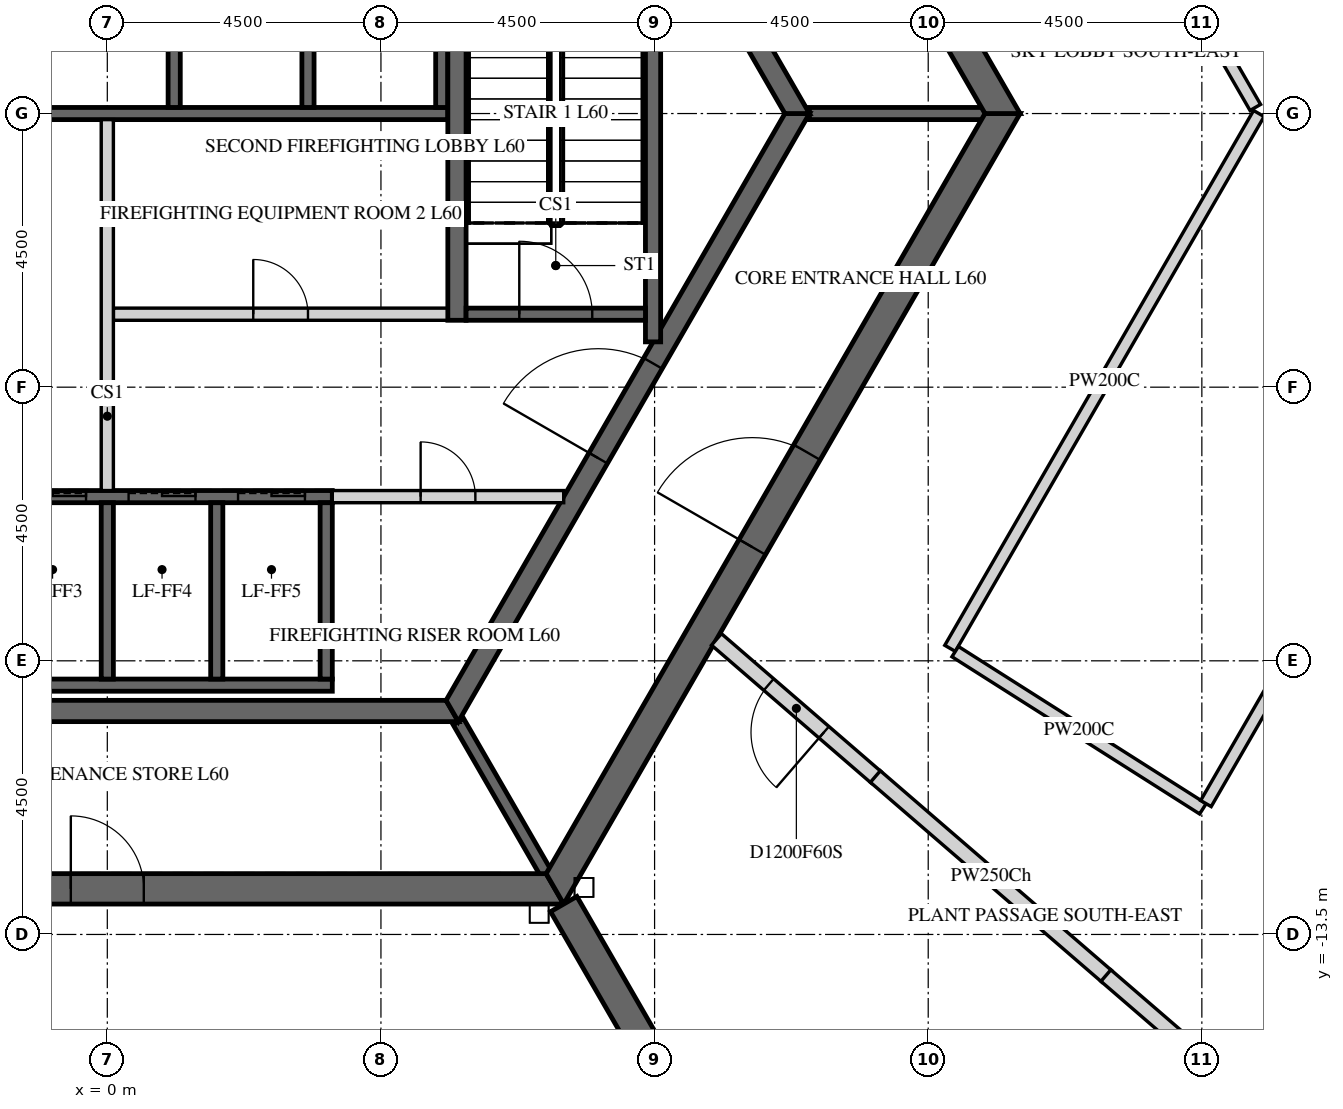
"""IFC4 building model, lengths in metres.
Left out: names, types, materials, properties, quantities, classifications, styles, units other than length and angle.
Written with IfcOpenShell. Run it as: python <this file> out.ifc"""

import sys

from ifc_helpers import new_model, si_unit, direction, frame, frame_2d, origin, place, context, subcontext, project, spatial, polyline, rectangle, outline, extrude, element, fill, save


model = new_model("IFC4")
c1 = context("Model", 3, precision=1e-05, world=origin(), true_north=direction((0.0, 1.0)))
c2 = subcontext(c1, "Body", "Model", "MODEL_VIEW")
j1 = project(units=[si_unit("LENGTHUNIT", "METRE"), si_unit("PLANEANGLEUNIT", "RADIAN")], contexts=[c1])
p1 = place(None, origin())
s1 = spatial("IfcSite", under=j1, at=p1, CompositionType="ELEMENT")
p2 = place(p1, origin())
s2 = spatial("IfcBuilding", under=s1, at=p2, CompositionType="ELEMENT")
p3 = place(p2, frame((0.0, 0.0, 250.2)))
s3 = spatial("IfcBuildingStorey", under=s2, at=p3, CompositionType="ELEMENT", Elevation=250.2)
p4 = place(p3, frame((31.656, -0.97, 5.7), z_axis=(0.0, 0.0, 1.0), x_axis=(-0.499997219864, -0.866027008891, 0.0)))
e1 = element("IfcWall", 1, at=p4, inside=s3, PredefinedType="PARAPET", context=c2, shape_type="SweptSolid", body=[
    extrude(outline(polyline([(0.009, -0.1), (27.732, -0.1), (27.749, 0.1), (-0.009, 0.1), (0.009, -0.1)])), origin(), (0.0, 0.0, 1.0), 1.1),
])
p5 = place(p3, frame((-7.361, -12.75, -0.3), z_axis=(0.0, 0.0, 1.0), x_axis=(1.0, 0.0, 0.0)))
e2 = element("IfcWall", 2, at=p5, inside=s3, PredefinedType="SHEAR", context=c2, shape_type="SweptSolid", body=[
    extrude(outline(polyline([(-0.144, -0.25), (14.866, -0.25), (14.578, 0.25), (0.144, 0.25), (-0.144, -0.25)])), origin(), (0.0, 0.0, 1.0), 5.8),
])
p6 = place(p5, frame((6.761, 0.0, 0.3)))
e3 = element("IfcOpeningElement", 3, at=p6, cuts=e2, PredefinedType="OPENING", context=c2, shape_type="SweptSolid", body=[
    extrude(rectangle(XDim=1.2, YDim=2.4, at=frame_2d((0.6, 1.2))), frame((0.0, 0.26, 0.0), z_axis=(0.0, -1.0, 0.0), x_axis=(1.0, 0.0, 0.0)), (0.0, 0.0, 1.0), 0.52),
])
p7 = place(p3, frame((7.361, -12.75, -0.3), z_axis=(0.0, 0.0, 1.0), x_axis=(0.50000571537, 0.866022103989, 0.0)))
e4 = element("IfcWall", 4, at=p7, inside=s3, PredefinedType="SHEAR", context=c2, shape_type="SweptSolid", body=[
    extrude(outline(polyline([(-0.144, -0.25), (14.867, -0.25), (14.578, 0.25), (0.144, 0.25), (-0.144, -0.25)])), origin(), (0.0, 0.0, 1.0), 5.8),
])
p8 = place(p7, frame((6.49, 0.0, 0.3)))
e5 = element("IfcOpeningElement", 5, at=p8, cuts=e4, PredefinedType="OPENING", context=c2, shape_type="SweptSolid", body=[
    extrude(rectangle(XDim=1.8, YDim=2.4, at=frame_2d((0.9, 1.2))), frame((0.0, 0.26, 0.0), z_axis=(0.0, -1.0, 0.0), x_axis=(1.0, 0.0, 0.0)), (0.0, 0.0, 1.0), 0.52),
])
p9 = place(p3, frame((14.722, 0.0, -0.3), z_axis=(0.0, 0.0, 1.0), x_axis=(-0.50000571537, 0.866022103989, 0.0)))
e6 = element("IfcWall", 6, at=p9, inside=s3, PredefinedType="SHEAR", context=c2, shape_type="SweptSolid", body=[
    extrude(outline(polyline([(-0.144, -0.25), (14.867, -0.25), (14.578, 0.25), (0.144, 0.25), (-0.144, -0.25)])), origin(), (0.0, 0.0, 1.0), 5.8),
])
p10 = place(p9, frame((6.432, 0.0, 0.3)))
e7 = element("IfcOpeningElement", 7, at=p10, cuts=e6, PredefinedType="OPENING", context=c2, shape_type="SweptSolid", body=[
    extrude(rectangle(XDim=1.8, YDim=2.4, at=frame_2d((0.9, 1.2))), frame((0.0, 0.26, 0.0), z_axis=(0.0, -1.0, 0.0), x_axis=(1.0, 0.0, 0.0)), (0.0, 0.0, 1.0), 0.52),
])
p11 = place(p3, frame((7.506, -13.0, -0.3), z_axis=(0.0, 0.0, 1.0), x_axis=(0.499988271576, -0.866032175087, 0.0)))
e8 = element("IfcWall", 8, at=p11, inside=s3, PredefinedType="SHEAR", context=c2, shape_type="SweptSolid", body=[
    extrude(rectangle(XDim=15.424, YDim=0.5, at=frame_2d((7.712, 0.0))), origin(), (0.0, 0.0, 1.0), 5.8),
])
p12 = place(p11, frame((6.812, 0.0, 0.3)))
e9 = element("IfcOpeningElement", 9, at=p12, cuts=e8, PredefinedType="OPENING", context=c2, shape_type="SweptSolid", body=[
    extrude(rectangle(XDim=1.8, YDim=2.4, at=frame_2d((0.9, 1.2))), frame((0.0, 0.26, 0.0), z_axis=(0.0, -1.0, 0.0), x_axis=(1.0, 0.0, 0.0)), (0.0, 0.0, 1.0), 0.52),
])
p13 = place(p3, frame((-5.673, -9.825, -0.3), z_axis=(0.0, 0.0, 1.0), x_axis=(1.0, 0.0, 0.0)))
e10 = element("IfcWall", 10, at=p13, inside=s3, PredefinedType="SHEAR", context=c2, shape_type="SweptSolid", body=[
    extrude(outline(polyline([(-0.101, -0.175), (11.446, -0.175), (11.244, 0.175), (0.101, 0.175), (-0.101, -0.175)])), origin(), (0.0, 0.0, 1.0), 5.8),
])
p14 = place(p3, frame((5.673, -9.825, -0.3), z_axis=(0.0, 0.0, 1.0), x_axis=(0.499995046907, 0.866028263435, 0.0)))
e11 = element("IfcWall", 11, at=p14, inside=s3, PredefinedType="SHEAR", context=c2, shape_type="SweptSolid", body=[
    extrude(outline(polyline([(-0.101, -0.175), (11.446, -0.175), (11.244, 0.175), (0.101, 0.175), (-0.101, -0.175)])), origin(), (0.0, 0.0, 1.0), 5.8),
])
p15 = place(p14, frame((4.801, 0.0, 0.3)))
e12 = element("IfcOpeningElement", 12, at=p15, cuts=e11, PredefinedType="OPENING", context=c2, shape_type="SweptSolid", body=[
    extrude(rectangle(XDim=1.8, YDim=2.4, at=frame_2d((0.9, 1.2))), frame((0.0, 0.185, 0.0), z_axis=(0.0, -1.0, 0.0), x_axis=(1.0, 0.0, 0.0)), (0.0, 0.0, 1.0), 0.37),
])
p16 = place(p3, frame((11.345, 0.0, -0.3), z_axis=(0.0, 0.0, 1.0), x_axis=(-0.499995046907, 0.866028263435, 0.0)))
e13 = element("IfcWall", 13, at=p16, inside=s3, PredefinedType="SHEAR", context=c2, shape_type="SweptSolid", body=[
    extrude(outline(polyline([(-0.101, -0.175), (11.446, -0.175), (11.244, 0.175), (0.101, 0.175), (-0.101, -0.175)])), origin(), (0.0, 0.0, 1.0), 5.8),
])
p17 = place(p16, frame((4.744, 0.0, 0.3)))
e14 = element("IfcOpeningElement", 14, at=p17, cuts=e13, PredefinedType="OPENING", context=c2, shape_type="SweptSolid", body=[
    extrude(rectangle(XDim=1.8, YDim=2.4, at=frame_2d((0.9, 1.2))), frame((0.0, 0.185, 0.0), z_axis=(0.0, -1.0, 0.0), x_axis=(1.0, 0.0, 0.0)), (0.0, 0.0, 1.0), 0.37),
])
p18 = place(p3, frame((-5.6, 0.0, -0.25), z_axis=(0.0, 0.0, 1.0), x_axis=(1.0, 0.0, 0.0)))
e15 = element("IfcWall", 15, at=p18, inside=s3, PredefinedType="SHEAR", context=c2, shape_type="SweptSolid", body=[
    extrude(rectangle(XDim=11.2, YDim=0.2, at=frame_2d((5.6, 0.0))), origin(), (0.0, 0.0, 1.0), 5.75),
])
for number, where, z_axis, x_axis in (
    (16, (1.1, 0.1, -0.25), (0.0, 0.0, 1.0), (0.0, 1.0, 0.0)),
    (17, (3.3, 0.1, -0.25), (0.0, 0.0, 1.0), (0.0, 1.0, 0.0)),
    (18, (5.5, 0.1, -0.25), (0.0, 0.0, 1.0), (0.0, 1.0, 0.0)),
):
    element("IfcWall", number, at=place(p3, frame(where, z_axis=z_axis, x_axis=x_axis)), inside=s3, PredefinedType="SHEAR", context=c2, shape_type="SweptSolid", body=[
        extrude(rectangle(XDim=3.1, YDim=0.2, at=frame_2d((1.55, 0.0))), origin(), (0.0, 0.0, 1.0), 5.75),
    ])
p19 = place(p3, frame((-5.5, -6.3, -0.25), z_axis=(0.0, 0.0, 1.0), x_axis=(1.0, 0.0, 0.0)))
e19 = element("IfcWall", 19, at=p19, inside=s3, PredefinedType="SHEAR", context=c2, shape_type="SweptSolid", body=[
    extrude(rectangle(XDim=9.2, YDim=0.2, at=frame_2d((4.6, 0.0))), origin(), (0.0, 0.0, 1.0), 5.75),
])
p20 = place(p19, frame((0.45, 0.0, 0.25)))
e20 = element("IfcOpeningElement", 20, at=p20, cuts=e19, PredefinedType="OPENING", context=c2, shape_type="SweptSolid", body=[
    extrude(rectangle(XDim=1.1, YDim=2.1, at=frame_2d((0.55, 1.05))), frame((0.0, 0.11, 0.0), z_axis=(0.0, -1.0, 0.0), x_axis=(1.0, 0.0, 0.0)), (0.0, 0.0, 1.0), 0.22),
])
p21 = place(p19, frame((2.25, 0.0, 0.25)))
e21 = element("IfcOpeningElement", 21, at=p21, cuts=e19, PredefinedType="OPENING", context=c2, shape_type="SweptSolid", body=[
    extrude(rectangle(XDim=1.1, YDim=2.1, at=frame_2d((0.55, 1.05))), frame((0.0, 0.11, 0.0), z_axis=(0.0, -1.0, 0.0), x_axis=(1.0, 0.0, 0.0)), (0.0, 0.0, 1.0), 0.22),
])
p22 = place(p19, frame((4.05, 0.0, 0.25)))
e22 = element("IfcOpeningElement", 22, at=p22, cuts=e19, PredefinedType="OPENING", context=c2, shape_type="SweptSolid", body=[
    extrude(rectangle(XDim=1.1, YDim=2.1, at=frame_2d((0.55, 1.05))), frame((0.0, 0.11, 0.0), z_axis=(0.0, -1.0, 0.0), x_axis=(1.0, 0.0, 0.0)), (0.0, 0.0, 1.0), 0.22),
])
p23 = place(p19, frame((5.85, 0.0, 0.25)))
e23 = element("IfcOpeningElement", 23, at=p23, cuts=e19, PredefinedType="OPENING", context=c2, shape_type="SweptSolid", body=[
    extrude(rectangle(XDim=1.1, YDim=2.1, at=frame_2d((0.55, 1.05))), frame((0.0, 0.11, 0.0), z_axis=(0.0, -1.0, 0.0), x_axis=(1.0, 0.0, 0.0)), (0.0, 0.0, 1.0), 0.22),
])
p24 = place(p19, frame((7.65, 0.0, 0.25)))
e24 = element("IfcOpeningElement", 24, at=p24, cuts=e19, PredefinedType="OPENING", context=c2, shape_type="SweptSolid", body=[
    extrude(rectangle(XDim=1.1, YDim=2.1, at=frame_2d((0.55, 1.05))), frame((0.0, 0.11, 0.0), z_axis=(0.0, -1.0, 0.0), x_axis=(1.0, 0.0, 0.0)), (0.0, 0.0, 1.0), 0.22),
])
p25 = place(p3, frame((-5.5, -9.4, -0.25), z_axis=(0.0, 0.0, 1.0), x_axis=(1.0, 0.0, 0.0)))
e25 = element("IfcWall", 25, at=p25, inside=s3, PredefinedType="SHEAR", context=c2, shape_type="SweptSolid", body=[
    extrude(rectangle(XDim=9.2, YDim=0.2, at=frame_2d((4.6, 0.0))), origin(), (0.0, 0.0, 1.0), 5.75),
])
for number, where, z_axis, x_axis in (
    (26, (0.0, -9.3, -0.25), (0.0, 0.0, 1.0), (0.0, 1.0, 0.0)),
    (27, (1.8, -9.3, -0.25), (0.0, 0.0, 1.0), (0.0, 1.0, 0.0)),
    (28, (3.6, -9.3, -0.25), (0.0, 0.0, 1.0), (0.0, 1.0, 0.0)),
):
    element("IfcWall", number, at=place(p3, frame(where, z_axis=z_axis, x_axis=x_axis)), inside=s3, PredefinedType="SHEAR", context=c2, shape_type="SweptSolid", body=[
        extrude(rectangle(XDim=2.9, YDim=0.2, at=frame_2d((1.45, 0.0))), origin(), (0.0, 0.0, 1.0), 5.75),
    ])
p26 = place(p3, frame((0.1, -3.3, 0.0), z_axis=(0.0, 0.0, 1.0), x_axis=(1.0, 0.0, 0.0)))
e29 = element("IfcWall", 29, at=p26, inside=s3, PredefinedType="PARTITIONING", context=c2, shape_type="SweptSolid", body=[
    extrude(rectangle(XDim=5.5, YDim=0.2, at=frame_2d((2.75, 0.0))), origin(), (0.0, 0.0, 1.0), 5.5),
])
p27 = place(p26, frame((2.3, 0.0, 0.0)))
e30 = element("IfcOpeningElement", 30, at=p27, cuts=e29, PredefinedType="OPENING", context=c2, shape_type="SweptSolid", body=[
    extrude(rectangle(XDim=0.9, YDim=2.1, at=frame_2d((0.45, 1.05))), frame((0.0, 0.11, 0.0), z_axis=(0.0, -1.0, 0.0), x_axis=(1.0, 0.0, 0.0)), (0.0, 0.0, 1.0), 0.22),
])
p28 = place(p3, frame((0.0, -6.2, 0.0), z_axis=(0.0, 0.0, 1.0), x_axis=(0.0, 1.0, 0.0)))
e31 = element("IfcWall", 31, at=p28, inside=s3, PredefinedType="PARTITIONING", context=c2, shape_type="SweptSolid", body=[
    extrude(rectangle(XDim=6.1, YDim=0.2, at=frame_2d((3.05, 0.0))), origin(), (0.0, 0.0, 1.0), 5.5),
])
p29 = place(p3, frame((3.7, -6.3, 0.0), z_axis=(0.0, 0.0, 1.0), x_axis=(1.0, 0.0, 0.0)))
e32 = element("IfcWall", 32, at=p29, inside=s3, PredefinedType="PARTITIONING", context=c2, shape_type="SweptSolid", body=[
    extrude(rectangle(XDim=3.806, YDim=0.2, at=frame_2d((1.903, 0.0))), origin(), (0.0, 0.0, 1.0), 5.5),
])
p30 = place(p29, frame((1.453, 0.0, 0.0)))
e33 = element("IfcOpeningElement", 33, at=p30, cuts=e32, PredefinedType="OPENING", context=c2, shape_type="SweptSolid", body=[
    extrude(rectangle(XDim=0.9, YDim=2.1, at=frame_2d((0.45, 1.05))), frame((0.0, 0.11, 0.0), z_axis=(0.0, -1.0, 0.0), x_axis=(1.0, 0.0, 0.0)), (0.0, 0.0, 1.0), 0.22),
])
for number, where, z_axis, x_axis in (
    (34, (11.547, 0.0, -0.3), (0.0, 0.0, 1.0), (1.0, 0.0, 0.0)),
    (35, (5.773, -10.0, -0.3), (0.0, 0.0, 1.0), (0.5, -0.866, 0.0)),
):
    element("IfcWall", number, at=place(p3, frame(where, z_axis=z_axis, x_axis=x_axis)), inside=s3, PredefinedType="SHEAR", context=c2, shape_type="SweptSolid", body=[
        extrude(rectangle(XDim=2.887, YDim=0.2, at=frame_2d((1.443, 0.0))), origin(), (0.0, 0.0, 1.0), 5.8),
    ])
p31 = place(p3, frame((5.75, -3.4, -0.25), z_axis=(0.0, 0.0, 1.0), x_axis=(0.0, 1.0, 0.0)))
e36 = element("IfcWall", 36, at=p31, inside=s3, PredefinedType="SHEAR", context=c2, shape_type="SweptSolid", body=[
    extrude(rectangle(XDim=6.8, YDim=0.3, at=frame_2d((3.4, 0.0))), origin(), (0.0, 0.0, 1.0), 5.75),
])
p32 = place(p3, frame((8.975, -3.755, -0.25), z_axis=(0.0, 0.0, 1.0), x_axis=(0.0, 1.0, 0.0)))
e37 = element("IfcWall", 37, at=p32, inside=s3, PredefinedType="SHEAR", context=c2, shape_type="SweptSolid", body=[
    extrude(rectangle(XDim=7.51, YDim=0.25, at=frame_2d((3.755, 0.0))), origin(), (0.0, 0.0, 1.0), 5.75),
])
p33 = place(p3, frame((5.9, -3.3, -0.25), z_axis=(0.0, 0.0, 1.0), x_axis=(1.0, 0.0, 0.0)))
e38 = element("IfcWall", 38, at=p33, inside=s3, PredefinedType="SHEAR", context=c2, shape_type="SweptSolid", body=[
    extrude(rectangle(XDim=2.95, YDim=0.2, at=frame_2d((1.475, 0.0))), origin(), (0.0, 0.0, 1.0), 5.75),
])
p34 = place(p33, frame((0.875, 0.0, 0.25)))
e39 = element("IfcOpeningElement", 39, at=p34, cuts=e38, PredefinedType="OPENING", context=c2, shape_type="SweptSolid", body=[
    extrude(rectangle(XDim=1.2, YDim=2.4, at=frame_2d((0.6, 1.2))), frame((0.0, 0.11, 0.0), z_axis=(0.0, -1.0, 0.0), x_axis=(1.0, 0.0, 0.0)), (0.0, 0.0, 1.0), 0.22),
])
p35 = place(p3, frame((12.645, -10.917, 0.0), z_axis=(0.0, 0.0, 1.0), x_axis=(-0.756778725629, 0.653671140892, 0.0)))
e40 = element("IfcWall", 40, at=p35, inside=s3, PredefinedType="PARTITIONING", context=c2, shape_type="SweptSolid", body=[
    extrude(rectangle(XDim=3.471, YDim=0.25, at=frame_2d((1.736, 0.0))), origin(), (0.0, 0.0, 1.0), 4.573),
])
p36 = place(p35, frame((1.135, 0.0, 0.0)))
e41 = element("IfcOpeningElement", 41, at=p36, cuts=e40, PredefinedType="OPENING", context=c2, shape_type="SweptSolid", body=[
    extrude(rectangle(XDim=1.2, YDim=2.1, at=frame_2d((0.6, 1.05))), frame((0.0, 0.135, 0.0), z_axis=(0.0, -1.0, 0.0), x_axis=(1.0, 0.0, 0.0)), (0.0, 0.0, 1.0), 0.27),
])
p37 = place(p3, frame((12.631, -10.903, 0.0), z_axis=(0.0, 0.0, 1.0), x_axis=(0.756924533262, -0.653502296053, 0.0)))
e42 = element("IfcWall", 42, at=p37, inside=s3, PredefinedType="PARTITIONING", context=c2, shape_type="SweptSolid", body=[
    extrude(rectangle(XDim=5.028, YDim=0.25, at=frame_2d((2.514, 0.0))), origin(), (0.0, 0.0, 1.0), 4.573),
])
p38 = place(p3, frame((13.859, -8.795, 0.0), z_axis=(0.0, 0.0, 1.0), x_axis=(0.500027655771, 0.866009436129, 0.0)))
e43 = element("IfcWall", 43, at=p38, inside=s3, PredefinedType="PARTITIONING", context=c2, shape_type="SweptSolid", body=[
    extrude(rectangle(XDim=10.156, YDim=0.2, at=frame_2d((5.078, 0.0))), origin(), (0.0, 0.0, 1.0), 5.5),
])
p39 = place(p3, frame((16.422, -14.176, 0.0), z_axis=(0.0, 0.0, 1.0), x_axis=(0.756922439124, -0.653504721598, 0.0)))
e44 = element("IfcWall", 44, at=p39, inside=s3, PredefinedType="PARTITIONING", context=c2, shape_type="SweptSolid", body=[
    extrude(rectangle(XDim=2.871, YDim=0.25, at=frame_2d((1.435, 0.0))), origin(), (0.0, 0.0, 1.0), 5.5),
])
p40 = place(p3, frame((18.017, -11.434, 0.0), z_axis=(0.0, 0.0, 1.0), x_axis=(-0.844296399795, 0.535876468315, 0.0)))
e45 = element("IfcWall", 45, at=p40, inside=s3, PredefinedType="PARTITIONING", context=c2, shape_type="SweptSolid", body=[
    extrude(rectangle(XDim=4.825, YDim=0.2, at=frame_2d((2.412, 0.0))), origin(), (0.0, 0.0, 1.0), 5.5),
])
p41 = place(p3, frame((26.564, -2.231, 0.0), z_axis=(0.0, 0.0, 1.0), x_axis=(-0.500020273296, -0.866013698675, 0.0)))
e46 = element("IfcWall", 46, at=p41, inside=s3, PredefinedType="PARTITIONING", context=c2, shape_type="SweptSolid", body=[
    extrude(rectangle(XDim=15.824, YDim=0.2, at=frame_2d((7.912, 0.0))), origin(), (0.0, 0.0, 1.0), 5.5),
])
p42 = place(p41, frame((7.412, 0.0, 0.0)))
e47 = element("IfcOpeningElement", 47, at=p42, cuts=e46, PredefinedType="OPENING", context=c2, shape_type="SweptSolid", body=[
    extrude(rectangle(XDim=1.0, YDim=2.1, at=frame_2d((0.5, 1.05))), frame((0.0, 0.11, 0.0), z_axis=(0.0, -1.0, 0.0), x_axis=(1.0, 0.0, 0.0)), (0.0, 0.0, 1.0), 0.22),
])
p43 = place(p3, frame((18.879, 0.1, 0.0), z_axis=(0.0, 0.0, 1.0), x_axis=(-0.499923693419, 0.866069454927, 0.0)))
e48 = element("IfcWall", 48, at=p43, inside=s3, PredefinedType="PARTITIONING", context=c2, shape_type="SweptSolid", body=[
    extrude(rectangle(XDim=6.931, YDim=0.2, at=frame_2d((3.466, 0.0))), origin(), (0.0, 0.0, 1.0), 5.5),
])
p44 = place(p3, frame((18.067, -11.347, 0.0), z_axis=(0.0, 0.0, 1.0), x_axis=(0.49997251285, 0.866041272916, 0.0)))
e49 = element("IfcWall", 49, at=p44, inside=s3, PredefinedType="PARTITIONING", context=c2, shape_type="SweptSolid", body=[
    extrude(rectangle(XDim=12.987, YDim=0.2, at=frame_2d((6.494, 0.0))), origin(), (0.0, 0.0, 1.0), 5.5),
])
p45 = place(p44, frame((5.994, 0.0, 0.0)))
e50 = element("IfcOpeningElement", 50, at=p45, cuts=e49, PredefinedType="OPENING", context=c2, shape_type="SweptSolid", body=[
    extrude(rectangle(XDim=1.0, YDim=2.1, at=frame_2d((0.5, 1.05))), frame((0.0, 0.11, 0.0), z_axis=(0.0, -1.0, 0.0), x_axis=(1.0, 0.0, 0.0)), (0.0, 0.0, 1.0), 0.22),
])
p46 = place(p8, origin())
e51 = element("IfcDoor", 51, at=p46, inside=s3, OperationType="DOUBLE_DOOR_SINGLE_SWING", PredefinedType="DOOR", context=c2, shape_type="SweptSolid", body=[
    extrude(rectangle(XDim=1.8, YDim=2.4, at=frame_2d((0.9, 1.2))), frame((0.0, 0.025, 0.0), z_axis=(0.0, -1.0, 0.0), x_axis=(1.0, 0.0, 0.0)), (0.0, 0.0, 1.0), 0.05),
])
fill(e5, e51)
p47 = place(p6, origin())
e52 = element("IfcDoor", 52, at=p47, inside=s3, OperationType="SINGLE_SWING_LEFT", PredefinedType="DOOR", context=c2, shape_type="SweptSolid", body=[
    extrude(rectangle(XDim=1.2, YDim=2.4, at=frame_2d((0.6, 1.2))), frame((0.0, 0.025, 0.0), z_axis=(0.0, -1.0, 0.0), x_axis=(1.0, 0.0, 0.0)), (0.0, 0.0, 1.0), 0.05),
])
fill(e3, e52)
p48 = place(p15, origin())
e53 = element("IfcDoor", 53, at=p48, inside=s3, OperationType="DOUBLE_DOOR_SINGLE_SWING", PredefinedType="DOOR", context=c2, shape_type="SweptSolid", body=[
    extrude(rectangle(XDim=1.8, YDim=2.4, at=frame_2d((0.9, 1.2))), frame((0.0, 0.025, 0.0), z_axis=(0.0, -1.0, 0.0), x_axis=(1.0, 0.0, 0.0)), (0.0, 0.0, 1.0), 0.05),
])
fill(e12, e53)
p49 = place(p27, origin())
e54 = element("IfcDoor", 54, at=p49, inside=s3, OperationType="SINGLE_SWING_LEFT", PredefinedType="DOOR", context=c2, shape_type="SweptSolid", body=[
    extrude(rectangle(XDim=0.9, YDim=2.1, at=frame_2d((0.45, 1.05))), frame((0.0, 0.025, 0.0), z_axis=(0.0, -1.0, 0.0), x_axis=(1.0, 0.0, 0.0)), (0.0, 0.0, 1.0), 0.05),
])
fill(e30, e54)
p50 = place(p30, origin())
e55 = element("IfcDoor", 55, at=p50, inside=s3, OperationType="SINGLE_SWING_LEFT", PredefinedType="DOOR", context=c2, shape_type="SweptSolid", body=[
    extrude(rectangle(XDim=0.9, YDim=2.1, at=frame_2d((0.45, 1.05))), frame((0.0, 0.025, 0.0), z_axis=(0.0, -1.0, 0.0), x_axis=(1.0, 0.0, 0.0)), (0.0, 0.0, 1.0), 0.05),
])
fill(e33, e55)
p51 = place(p34, origin())
e56 = element("IfcDoor", 56, at=p51, inside=s3, OperationType="SINGLE_SWING_LEFT", PredefinedType="DOOR", context=c2, shape_type="SweptSolid", body=[
    extrude(rectangle(XDim=1.2, YDim=2.4, at=frame_2d((0.6, 1.2))), frame((0.0, 0.025, 0.0), z_axis=(0.0, -1.0, 0.0), x_axis=(1.0, 0.0, 0.0)), (0.0, 0.0, 1.0), 0.05),
])
fill(e39, e56)
p52 = place(p22, origin())
e57 = element("IfcDoor", 57, at=p52, inside=s3, OperationType="SLIDING_TO_LEFT", PredefinedType="DOOR", context=c2, shape_type="SweptSolid", body=[
    extrude(rectangle(XDim=1.1, YDim=2.1, at=frame_2d((0.55, 1.05))), frame((0.0, 0.025, 0.0), z_axis=(0.0, -1.0, 0.0), x_axis=(1.0, 0.0, 0.0)), (0.0, 0.0, 1.0), 0.05),
])
fill(e22, e57)
p53 = place(p23, origin())
e58 = element("IfcDoor", 58, at=p53, inside=s3, OperationType="SLIDING_TO_LEFT", PredefinedType="DOOR", context=c2, shape_type="SweptSolid", body=[
    extrude(rectangle(XDim=1.1, YDim=2.1, at=frame_2d((0.55, 1.05))), frame((0.0, 0.025, 0.0), z_axis=(0.0, -1.0, 0.0), x_axis=(1.0, 0.0, 0.0)), (0.0, 0.0, 1.0), 0.05),
])
fill(e23, e58)
p54 = place(p24, origin())
e59 = element("IfcDoor", 59, at=p54, inside=s3, OperationType="SLIDING_TO_LEFT", PredefinedType="DOOR", context=c2, shape_type="SweptSolid", body=[
    extrude(rectangle(XDim=1.1, YDim=2.1, at=frame_2d((0.55, 1.05))), frame((0.0, 0.025, 0.0), z_axis=(0.0, -1.0, 0.0), x_axis=(1.0, 0.0, 0.0)), (0.0, 0.0, 1.0), 0.05),
])
fill(e24, e59)
p55 = place(p36, origin())
e60 = element("IfcDoor", 60, at=p55, inside=s3, OperationType="SINGLE_SWING_LEFT", PredefinedType="DOOR", context=c2, shape_type="SweptSolid", body=[
    extrude(rectangle(XDim=1.2, YDim=2.1, at=frame_2d((0.6, 1.05))), frame((0.0, 0.025, 0.0), z_axis=(0.0, -1.0, 0.0), x_axis=(1.0, 0.0, 0.0)), (0.0, 0.0, 1.0), 0.05),
])
fill(e41, e60)
save(model, sys.argv[1])
